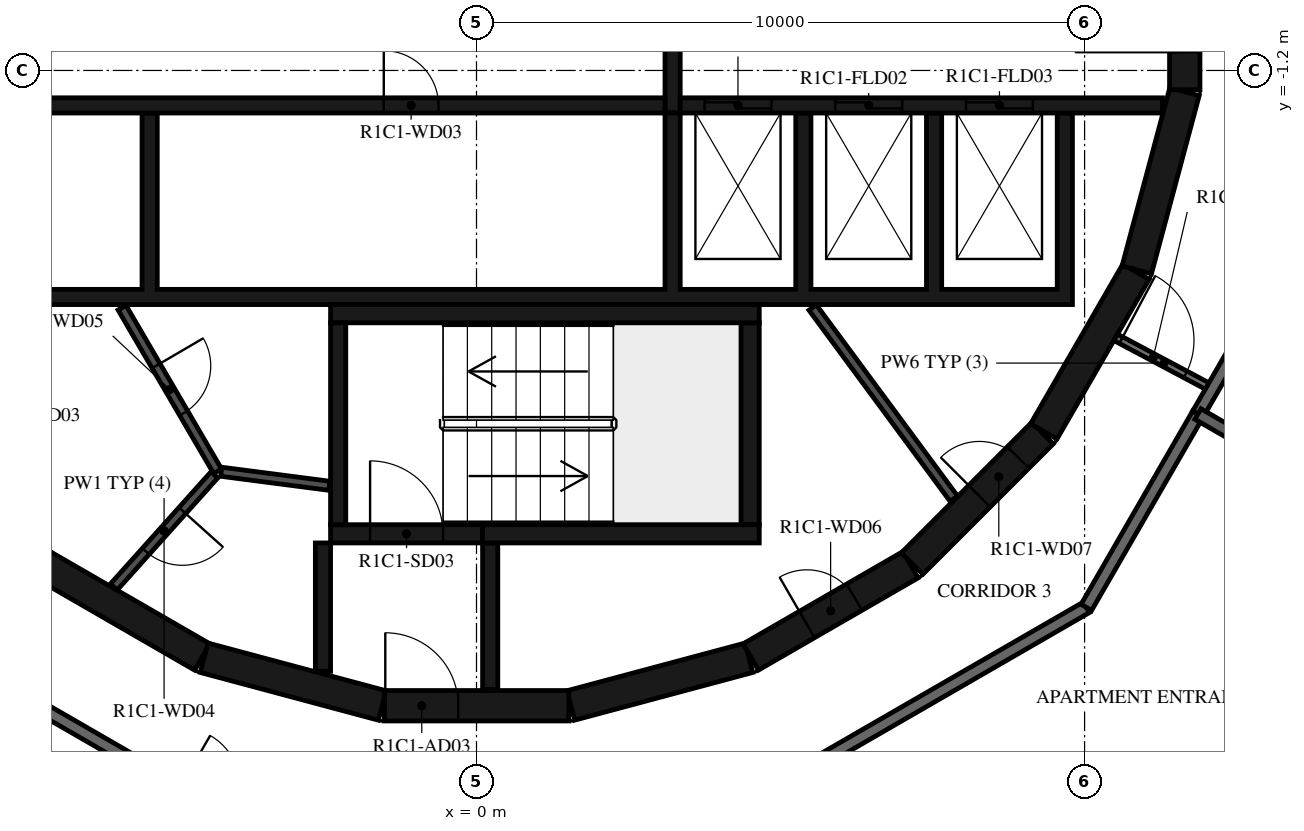
"""IFC4 building model, lengths in metres.
Left out: names, types, materials, properties, quantities, classifications, styles, units other than length and angle.
Written with IfcOpenShell. Run it as: python <this file> out.ifc"""

import sys

from ifc_helpers import new_model, si_unit, direction, frame, frame_2d, origin, place, context, subcontext, project, spatial, polyline, rectangle, outline, extrude, element, fill, save


model = new_model("IFC4")
c1 = context("Model", 3, precision=1e-05, world=origin(), true_north=direction((0.0, 1.0)))
c2 = subcontext(c1, "Body", "Model", "MODEL_VIEW")
j1 = project(units=[si_unit("LENGTHUNIT", "METRE"), si_unit("PLANEANGLEUNIT", "RADIAN")], contexts=[c1])
p1 = place(None, origin())
s1 = spatial("IfcSite", under=j1, at=p1, CompositionType="ELEMENT")
p2 = place(p1, origin())
s2 = spatial("IfcBuilding", under=s1, at=p2, CompositionType="ELEMENT")
p3 = place(p2, frame((0.0, 0.0, 62.9)))
s3 = spatial("IfcBuildingStorey", under=s2, at=p3, CompositionType="ELEMENT", Elevation=62.9)
p4 = place(p3, frame((1.55, -11.643, 0.0), z_axis=(0.0, 0.0, 1.0), x_axis=(0.965948410781, 0.258734743916, 0.0)))
e1 = element("IfcWall", 1, at=p4, inside=s3, PredefinedType="SHEAR", context=c2, shape_type="SweptSolid", body=[
    extrude(rectangle(XDim=3.033, YDim=0.5, at=frame_2d((1.516, 0.0))), origin(), (0.0, 0.0, 1.0), 3.12),
])
p5 = place(p3, frame((4.51, -10.845, 0.0), z_axis=(0.0, 0.0, 1.0), x_axis=(0.865975092491, 0.500087131594, 0.0)))
e2 = element("IfcWall", 2, at=p5, inside=s3, PredefinedType="SHEAR", context=c2, shape_type="SweptSolid", body=[
    extrude(rectangle(XDim=3.033, YDim=0.5, at=frame_2d((1.516, 0.0))), origin(), (0.0, 0.0, 1.0), 3.12),
])
p6 = place(p5, frame((1.066, 0.0, 0.0)))
e3 = element("IfcOpeningElement", 3, at=p6, cuts=e2, PredefinedType="OPENING", context=c2, shape_type="SweptSolid", body=[
    extrude(rectangle(XDim=0.9, YDim=2.1, at=frame_2d((0.45, 1.05))), frame((0.0, 0.26, 0.0), z_axis=(0.0, -1.0, 0.0), x_axis=(1.0, 0.0, 0.0)), (0.0, 0.0, 1.0), 0.52),
])
p7 = place(p3, frame((7.164, -9.308, 0.0), z_axis=(0.0, 0.0, 1.0), x_axis=(0.707106781187, 0.707106781187, 0.0)))
e4 = element("IfcWall", 4, at=p7, inside=s3, PredefinedType="SHEAR", context=c2, shape_type="SweptSolid", body=[
    extrude(rectangle(XDim=3.032, YDim=0.5, at=frame_2d((1.516, 0.0))), origin(), (0.0, 0.0, 1.0), 3.12),
])
p8 = place(p7, frame((1.566, 0.0, 0.0)))
e5 = element("IfcOpeningElement", 5, at=p8, cuts=e4, PredefinedType="OPENING", context=c2, shape_type="SweptSolid", body=[
    extrude(rectangle(XDim=0.9, YDim=2.1, at=frame_2d((0.45, 1.05))), frame((0.0, 0.26, 0.0), z_axis=(0.0, -1.0, 0.0), x_axis=(1.0, 0.0, 0.0)), (0.0, 0.0, 1.0), 0.52),
])
for number, where, z_axis, x_axis in (
    (6, (9.329, -7.137, 0.0), (0.0, 0.0, 1.0), (0.5, 0.866, 0.0)),
    (7, (10.858, -4.479, 0.0), (0.0, 0.0, 1.0), (0.259, 0.966, 0.0)),
):
    element("IfcWall", number, at=place(p3, frame(where, z_axis=z_axis, x_axis=x_axis)), inside=s3, PredefinedType="SHEAR", context=c2, shape_type="SweptSolid", body=[
        extrude(rectangle(XDim=3.033, YDim=0.5, at=frame_2d((1.516, 0.0))), origin(), (0.0, 0.0, 1.0), 3.12),
    ])
p9 = place(p3, frame((11.647, -1.516, 0.0), z_axis=(0.0, 0.0, 1.0), x_axis=(0.0, 1.0, 0.0)))
e8 = element("IfcWall", 8, at=p9, inside=s3, PredefinedType="SHEAR", context=c2, shape_type="SweptSolid", body=[
    extrude(rectangle(XDim=3.033, YDim=0.5, at=frame_2d((1.516, 0.0))), origin(), (0.0, 0.0, 1.0), 3.12),
])
p10 = place(p9, frame((0.616, 0.0, 0.0)))
e9 = element("IfcOpeningElement", 9, at=p10, cuts=e8, PredefinedType="OPENING", context=c2, shape_type="SweptSolid", body=[
    extrude(rectangle(XDim=1.8, YDim=2.1, at=frame_2d((0.9, 1.05))), frame((0.0, 0.26, 0.0), z_axis=(0.0, -1.0, 0.0), x_axis=(1.0, 0.0, 0.0)), (0.0, 0.0, 1.0), 0.52),
])
for number, where, z_axis, x_axis in (
    (10, (-7.137, -9.329, 0.0), (0.0, 0.0, 1.0), (0.866, -0.5, 0.0)),
    (11, (-4.479, -10.858, 0.0), (0.0, 0.0, 1.0), (0.966, -0.259, 0.0)),
):
    element("IfcWall", number, at=place(p3, frame(where, z_axis=z_axis, x_axis=x_axis)), inside=s3, PredefinedType="SHEAR", context=c2, shape_type="SweptSolid", body=[
        extrude(rectangle(XDim=3.033, YDim=0.5, at=frame_2d((1.516, 0.0))), origin(), (0.0, 0.0, 1.0), 3.12),
    ])
p11 = place(p3, frame((-1.516, -11.647, 0.0), z_axis=(0.0, 0.0, 1.0), x_axis=(1.0, 0.0, 0.0)))
e12 = element("IfcWall", 12, at=p11, inside=s3, PredefinedType="SHEAR", context=c2, shape_type="SweptSolid", body=[
    extrude(rectangle(XDim=3.033, YDim=0.5, at=frame_2d((1.516, 0.0))), origin(), (0.0, 0.0, 1.0), 3.12),
])
p12 = place(p11, frame((0.016, 0.0, 0.0)))
e13 = element("IfcOpeningElement", 13, at=p12, cuts=e12, PredefinedType="OPENING", context=c2, shape_type="SweptSolid", body=[
    extrude(rectangle(XDim=1.2, YDim=2.1, at=frame_2d((0.6, 1.05))), frame((0.0, 0.26, 0.0), z_axis=(0.0, -1.0, 0.0), x_axis=(1.0, 0.0, 0.0)), (0.0, 0.0, 1.0), 0.52),
])
p13 = place(p3, frame((-2.275, -8.67, 0.0), z_axis=(0.0, 0.0, 1.0), x_axis=(0.0, 1.0, 0.0)))
e14 = element("IfcWall", 14, at=p13, inside=s3, PredefinedType="SHEAR", context=c2, shape_type="SweptSolid", body=[
    extrude(rectangle(XDim=3.32, YDim=0.25, at=frame_2d((1.66, 0.0))), origin(), (0.0, 0.0, 1.0), 3.12),
])
p14 = place(p3, frame((-2.4, -5.2, 0.0), z_axis=(0.0, 0.0, 1.0), x_axis=(1.0, 0.0, 0.0)))
e15 = element("IfcWall", 15, at=p14, inside=s3, PredefinedType="SHEAR", context=c2, shape_type="SweptSolid", body=[
    extrude(rectangle(XDim=7.05, YDim=0.3, at=frame_2d((3.525, 0.0))), origin(), (0.0, 0.0, 1.0), 3.12),
])
p15 = place(p3, frame((4.5, -8.67, 0.0), z_axis=(0.0, 0.0, 1.0), x_axis=(0.0, 1.0, 0.0)))
e16 = element("IfcWall", 16, at=p15, inside=s3, PredefinedType="SHEAR", context=c2, shape_type="SweptSolid", body=[
    extrude(rectangle(XDim=3.32, YDim=0.3, at=frame_2d((1.66, 0.0))), origin(), (0.0, 0.0, 1.0), 3.12),
])
p16 = place(p3, frame((0.1, -8.82, 0.0), z_axis=(0.0, 0.0, 1.0), x_axis=(1.0, 0.0, 0.0)))
e17 = element("IfcWall", 17, at=p16, inside=s3, PredefinedType="SHEAR", context=c2, shape_type="SweptSolid", body=[
    extrude(rectangle(XDim=4.55, YDim=0.3, at=frame_2d((2.275, 0.0))), origin(), (0.0, 0.0, 1.0), 3.12),
])
p17 = place(p3, frame((-2.4, -8.82, 0.0), z_axis=(0.0, 0.0, 1.0), x_axis=(1.0, 0.0, 0.0)))
e18 = element("IfcWall", 18, at=p17, inside=s3, PredefinedType="SHEAR", context=c2, shape_type="SweptSolid", body=[
    extrude(rectangle(XDim=2.5, YDim=0.3, at=frame_2d((1.25, 0.0))), origin(), (0.0, 0.0, 1.0), 3.12),
])
p18 = place(p17, frame((0.65, 0.0, 0.0)))
e19 = element("IfcOpeningElement", 19, at=p18, cuts=e18, PredefinedType="OPENING", context=c2, shape_type="SweptSolid", body=[
    extrude(rectangle(XDim=1.2, YDim=2.1, at=frame_2d((0.6, 1.05))), frame((0.0, 0.16, 0.0), z_axis=(0.0, -1.0, 0.0), x_axis=(1.0, 0.0, 0.0)), (0.0, 0.0, 1.0), 0.32),
])
p19 = place(p3, frame((-2.525, -8.97, 0.0), z_axis=(0.0, 0.0, 1.0), x_axis=(0.0, -1.0, 0.0)))
e20 = element("IfcWall", 20, at=p19, inside=s3, PredefinedType="SHEAR", context=c2, shape_type="SweptSolid", body=[
    extrude(rectangle(XDim=2.11, YDim=0.25, at=frame_2d((1.055, 0.0))), origin(), (0.0, 0.0, 1.0), 3.12),
])
p20 = place(p3, frame((0.225, -8.97, 0.0), z_axis=(0.0, 0.0, 1.0), x_axis=(0.0, -1.0, 0.0)))
e21 = element("IfcWall", 21, at=p20, inside=s3, PredefinedType="SHEAR", context=c2, shape_type="SweptSolid", body=[
    extrude(rectangle(XDim=2.41, YDim=0.25, at=frame_2d((1.205, 0.0))), origin(), (0.0, 0.0, 1.0), 3.12),
])
p21 = place(p3, origin())
e22 = element("IfcWall", 22, at=p21, inside=s3, PredefinedType="SHEAR", context=c2, shape_type="SweptSolid", body=[
    extrude(outline(polyline([(9.8, -5.05), (9.8, -4.8), (9.8, -1.9), (9.55, -1.9), (9.55, -4.8), (7.65, -4.8), (7.65, -1.9), (7.4, -1.9), (7.4, -4.8), (5.5, -4.8), (5.5, -1.9), (5.25, -1.9), (5.25, -4.8), (3.35, -4.8), (3.35, -1.9), (3.1, -1.9), (3.1, -4.8), (-5.25, -4.8), (-5.25, -1.9), (-5.5, -1.9), (-5.5, -4.8), (-7.4, -4.8), (-7.4, -1.9), (-7.65, -1.9), (-7.65, -4.8), (-9.55, -4.8), (-9.55, -1.9), (-9.8, -1.9), (-9.8, -4.8), (-9.8, -5.05), (9.8, -5.05)])), origin(), (0.0, 0.0, 1.0), 3.12),
])
p22 = place(p3, frame((-11.28, -1.775, 0.0), z_axis=(0.0, 0.0, 1.0), x_axis=(1.0, 0.0, 0.0)))
e23 = element("IfcWall", 23, at=p22, inside=s3, PredefinedType="SHEAR", context=c2, shape_type="SweptSolid", body=[
    extrude(rectangle(XDim=14.38, YDim=0.25, at=frame_2d((7.19, 0.0))), origin(), (0.0, 0.0, 1.0), 3.12),
])
p23 = place(p22, frame((9.755, 0.0, 0.0)))
e24 = element("IfcOpeningElement", 24, at=p23, cuts=e23, PredefinedType="OPENING", context=c2, shape_type="SweptSolid", body=[
    extrude(rectangle(XDim=0.9, YDim=2.1, at=frame_2d((0.45, 1.05))), frame((0.0, 0.135, 0.0), z_axis=(0.0, -1.0, 0.0), x_axis=(1.0, 0.0, 0.0)), (0.0, 0.0, 1.0), 0.27),
])
p24 = place(p3, frame((3.35, -1.775, 0.0), z_axis=(0.0, 0.0, 1.0), x_axis=(1.0, 0.0, 0.0)))
e25 = element("IfcWall", 25, at=p24, inside=s3, PredefinedType="SHEAR", context=c2, shape_type="SweptSolid", body=[
    extrude(rectangle(XDim=7.93, YDim=0.25, at=frame_2d((3.965, 0.0))), origin(), (0.0, 0.0, 1.0), 3.12),
])
p25 = place(p24, frame((0.4, 0.0, 0.0)))
e26 = element("IfcOpeningElement", 26, at=p25, cuts=e25, PredefinedType="OPENING", context=c2, shape_type="SweptSolid", body=[
    extrude(rectangle(XDim=1.1, YDim=2.4, at=frame_2d((0.55, 1.2))), frame((0.0, 0.135, 0.0), z_axis=(0.0, -1.0, 0.0), x_axis=(1.0, 0.0, 0.0)), (0.0, 0.0, 1.0), 0.27),
])
p26 = place(p24, frame((2.55, 0.0, 0.0)))
e27 = element("IfcOpeningElement", 27, at=p26, cuts=e25, PredefinedType="OPENING", context=c2, shape_type="SweptSolid", body=[
    extrude(rectangle(XDim=1.1, YDim=2.4, at=frame_2d((0.55, 1.2))), frame((0.0, 0.135, 0.0), z_axis=(0.0, -1.0, 0.0), x_axis=(1.0, 0.0, 0.0)), (0.0, 0.0, 1.0), 0.27),
])
p27 = place(p24, frame((4.7, 0.0, 0.0)))
e28 = element("IfcOpeningElement", 28, at=p27, cuts=e25, PredefinedType="OPENING", context=c2, shape_type="SweptSolid", body=[
    extrude(rectangle(XDim=1.1, YDim=2.4, at=frame_2d((0.55, 1.2))), frame((0.0, 0.135, 0.0), z_axis=(0.0, -1.0, 0.0), x_axis=(1.0, 0.0, 0.0)), (0.0, 0.0, 1.0), 0.27),
])
p28 = place(p3, frame((3.225, -1.9, 0.0), z_axis=(0.0, 0.0, 1.0), x_axis=(0.0, 1.0, 0.0)))
e29 = element("IfcWall", 29, at=p28, inside=s3, PredefinedType="SHEAR", context=c2, shape_type="SweptSolid", body=[
    extrude(rectangle(XDim=3.8, YDim=0.25, at=frame_2d((1.9, 0.0))), origin(), (0.0, 0.0, 1.0), 3.12),
])
p29 = place(p3, frame((5.528, -5.098, 0.0), z_axis=(0.0, 0.0, 1.0), x_axis=(0.594034318069, -0.804439698769, 0.0)))
e30 = element("IfcWall", 30, at=p29, inside=s3, PredefinedType="PARTITIONING", context=c2, shape_type="SweptSolid", body=[
    extrude(rectangle(XDim=3.907, YDim=0.15, at=frame_2d((1.953, 0.0))), origin(), (0.0, 0.0, 1.0), 3.12),
])
p30 = place(p3, frame((-5.829, -5.102, 0.0), z_axis=(0.0, 0.0, 1.0), x_axis=(0.504480008384, -0.863423373057, 0.0)))
e31 = element("IfcWall", 31, at=p30, inside=s3, PredefinedType="PARTITIONING", context=c2, shape_type="SweptSolid", body=[
    extrude(rectangle(XDim=3.115, YDim=0.15, at=frame_2d((1.558, 0.0))), origin(), (0.0, 0.0, 1.0), 3.12),
])
p31 = place(p30, frame((1.107, 0.0, 0.0)))
e32 = element("IfcOpeningElement", 32, at=p31, cuts=e31, PredefinedType="OPENING", context=c2, shape_type="SweptSolid", body=[
    extrude(rectangle(XDim=0.9, YDim=2.1, at=frame_2d((0.45, 1.05))), frame((0.0, 0.085, 0.0), z_axis=(0.0, -1.0, 0.0), x_axis=(1.0, 0.0, 0.0)), (0.0, 0.0, 1.0), 0.17),
])
p32 = place(p3, frame((-4.311, -7.851, 0.0), z_axis=(0.0, 0.0, 1.0), x_axis=(-0.667869133096, -0.744278725383, 0.0)))
e33 = element("IfcWall", 33, at=p32, inside=s3, PredefinedType="PARTITIONING", context=c2, shape_type="SweptSolid", body=[
    extrude(rectangle(XDim=2.476, YDim=0.15, at=frame_2d((1.238, 0.0))), origin(), (0.0, 0.0, 1.0), 3.12),
])
p33 = place(p32, frame((0.788, 0.0, 0.0)))
e34 = element("IfcOpeningElement", 34, at=p33, cuts=e33, PredefinedType="OPENING", context=c2, shape_type="SweptSolid", body=[
    extrude(rectangle(XDim=0.9, YDim=2.1, at=frame_2d((0.45, 1.05))), frame((0.0, 0.085, 0.0), z_axis=(0.0, -1.0, 0.0), x_axis=(1.0, 0.0, 0.0)), (0.0, 0.0, 1.0), 0.17),
])
p34 = place(p3, frame((-4.198, -7.799, 0.0), z_axis=(0.0, 0.0, 1.0), x_axis=(0.991686747293, -0.128675542523, 0.0)))
e35 = element("IfcWall", 35, at=p34, inside=s3, PredefinedType="PARTITIONING", context=c2, shape_type="SweptSolid", body=[
    extrude(rectangle(XDim=1.793, YDim=0.15, at=frame_2d((0.896, 0.0))), origin(), (0.0, 0.0, 1.0), 3.12),
])
p35 = place(p3, frame((10.511, -5.589, 0.0), z_axis=(0.0, 0.0, 1.0), x_axis=(0.88294043061, -0.469485032769, 0.0)))
e36 = element("IfcWall", 36, at=p35, inside=s3, PredefinedType="PARTITIONING", context=c2, shape_type="SweptSolid", body=[
    extrude(rectangle(XDim=1.804, YDim=0.12, at=frame_2d((0.902, 0.0))), origin(), (0.0, 0.0, 1.0), 3.12),
])
p36 = place(p35, frame((0.1, 0.0, 0.0)))
e37 = element("IfcOpeningElement", 37, at=p36, cuts=e36, PredefinedType="OPENING", context=c2, shape_type="SweptSolid", body=[
    extrude(rectangle(XDim=1.2, YDim=2.1, at=frame_2d((0.6, 1.05))), frame((0.0, 0.07, 0.0), z_axis=(0.0, -1.0, 0.0), x_axis=(1.0, 0.0, 0.0)), (0.0, 0.0, 1.0), 0.14),
])
p37 = place(p3, frame((11.865, -6.85, 0.0), z_axis=(0.0, 0.0, 1.0), x_axis=(0.499987270552, 0.86603275301, 0.0)))
e38 = element("IfcWall", 38, at=p37, inside=s3, PredefinedType="STANDARD", context=c2, shape_type="SweptSolid", body=[
    extrude(rectangle(XDim=3.671, YDim=0.2, at=frame_2d((1.835, 0.0))), origin(), (0.0, 0.0, 1.0), 3.12),
])
p38 = place(p3, frame((-10.029, -10.029, 0.0), z_axis=(0.0, 0.0, 1.0), x_axis=(0.866022878987, -0.500004373052, 0.0)))
e39 = element("IfcWall", 39, at=p38, inside=s3, PredefinedType="STANDARD", context=c2, shape_type="SweptSolid", body=[
    extrude(rectangle(XDim=7.146, YDim=0.2, at=frame_2d((3.573, 0.0))), origin(), (0.0, 0.0, 1.0), 3.12),
])
p39 = place(p38, frame((5.947, 0.0, 0.0)))
e40 = element("IfcOpeningElement", 40, at=p39, cuts=e39, PredefinedType="OPENING", context=c2, shape_type="SweptSolid", body=[
    extrude(rectangle(XDim=1.0, YDim=2.1, at=frame_2d((0.5, 1.05))), frame((0.0, 0.11, 0.0), z_axis=(0.0, -1.0, 0.0), x_axis=(1.0, 0.0, 0.0)), (0.0, 0.0, 1.0), 0.22),
])
p40 = place(p3, frame((3.671, -13.7, 0.0), z_axis=(0.0, 0.0, 1.0), x_axis=(0.866024439905, 0.500001669485, 0.0)))
e41 = element("IfcWall", 41, at=p40, inside=s3, PredefinedType="STANDARD", context=c2, shape_type="SweptSolid", body=[
    extrude(rectangle(XDim=7.342, YDim=0.2, at=frame_2d((3.671, 0.0))), origin(), (0.0, 0.0, 1.0), 3.12),
])
p41 = place(p3, frame((10.029, -10.029, 0.0), z_axis=(0.0, 0.0, 1.0), x_axis=(0.50001606911, 0.866016126081, 0.0)))
e42 = element("IfcWall", 42, at=p41, inside=s3, PredefinedType="STANDARD", context=c2, shape_type="SweptSolid", body=[
    extrude(rectangle(XDim=3.671, YDim=0.2, at=frame_2d((1.835, 0.0))), origin(), (0.0, 0.0, 1.0), 3.12),
])
p42 = place(p3, frame((16.817, -9.709, 0.0), z_axis=(0.0, 0.0, 1.0), x_axis=(-0.86604338933, 0.499968846828, 0.0)))
e43 = element("IfcWall", 43, at=p42, inside=s3, PredefinedType="STANDARD", context=c2, shape_type="SweptSolid", body=[
    extrude(rectangle(XDim=5.718, YDim=0.2, at=frame_2d((2.859, 0.0))), origin(), (0.0, 0.0, 1.0), 3.12),
])
p43 = place(p3, frame((-11.127, -11.127, 0.0), z_axis=(0.0, 0.0, 1.0), x_axis=(0.866034514313, -0.499984219769, 0.0)))
e44 = element("IfcWall", 44, at=p43, inside=s3, PredefinedType="PARTITIONING", context=c2, shape_type="SweptSolid", body=[
    extrude(rectangle(XDim=5.006, YDim=0.12, at=frame_2d((2.503, 0.0))), origin(), (0.0, 0.0, 1.0), 3.12),
])
p44 = place(p43, frame((0.2, 0.0, 0.0)))
e45 = element("IfcOpeningElement", 45, at=p44, cuts=e44, PredefinedType="OPENING", context=c2, shape_type="SweptSolid", body=[
    extrude(rectangle(XDim=0.9, YDim=2.1, at=frame_2d((0.45, 1.05))), frame((0.0, 0.07, 0.0), z_axis=(0.0, -1.0, 0.0), x_axis=(1.0, 0.0, 0.0)), (0.0, 0.0, 1.0), 0.14),
])
p45 = place(p18, origin())
e46 = element("IfcDoor", 46, at=p45, inside=s3, OperationType="SINGLE_SWING_LEFT", PredefinedType="DOOR", context=c2, shape_type="SweptSolid", body=[
    extrude(rectangle(XDim=1.2, YDim=2.1, at=frame_2d((0.6, 1.05))), frame((0.0, 0.025, 0.0), z_axis=(0.0, -1.0, 0.0), x_axis=(1.0, 0.0, 0.0)), (0.0, 0.0, 1.0), 0.05),
])
fill(e19, e46)
p46 = place(p12, origin())
e47 = element("IfcDoor", 47, at=p46, inside=s3, OperationType="SINGLE_SWING_RIGHT", PredefinedType="DOOR", context=c2, shape_type="SweptSolid", body=[
    extrude(rectangle(XDim=1.2, YDim=2.1, at=frame_2d((0.6, 1.05))), frame((0.0, 0.025, 0.0), z_axis=(0.0, -1.0, 0.0), x_axis=(1.0, 0.0, 0.0)), (0.0, 0.0, 1.0), 0.05),
])
fill(e13, e47)
p47 = place(p10, origin())
e48 = element("IfcDoor", 48, at=p47, inside=s3, OperationType="DOUBLE_DOOR_SINGLE_SWING", PredefinedType="DOOR", context=c2, shape_type="SweptSolid", body=[
    extrude(rectangle(XDim=1.8, YDim=2.1, at=frame_2d((0.9, 1.05))), frame((0.0, 0.025, 0.0), z_axis=(0.0, -1.0, 0.0), x_axis=(1.0, 0.0, 0.0)), (0.0, 0.0, 1.0), 0.05),
])
fill(e9, e48)
p48 = place(p25, origin())
e49 = element("IfcDoor", 49, at=p48, inside=s3, OperationType="DOUBLE_DOOR_SLIDING", PredefinedType="DOOR", context=c2, shape_type="SweptSolid", body=[
    extrude(rectangle(XDim=1.1, YDim=2.4, at=frame_2d((0.55, 1.2))), frame((0.0, 0.025, 0.0), z_axis=(0.0, -1.0, 0.0), x_axis=(1.0, 0.0, 0.0)), (0.0, 0.0, 1.0), 0.05),
])
fill(e26, e49)
p49 = place(p26, origin())
e50 = element("IfcDoor", 50, at=p49, inside=s3, OperationType="DOUBLE_DOOR_SLIDING", PredefinedType="DOOR", context=c2, shape_type="SweptSolid", body=[
    extrude(rectangle(XDim=1.1, YDim=2.4, at=frame_2d((0.55, 1.2))), frame((0.0, 0.025, 0.0), z_axis=(0.0, -1.0, 0.0), x_axis=(1.0, 0.0, 0.0)), (0.0, 0.0, 1.0), 0.05),
])
fill(e27, e50)
p50 = place(p27, origin())
e51 = element("IfcDoor", 51, at=p50, inside=s3, OperationType="DOUBLE_DOOR_SLIDING", PredefinedType="DOOR", context=c2, shape_type="SweptSolid", body=[
    extrude(rectangle(XDim=1.1, YDim=2.4, at=frame_2d((0.55, 1.2))), frame((0.0, 0.025, 0.0), z_axis=(0.0, -1.0, 0.0), x_axis=(1.0, 0.0, 0.0)), (0.0, 0.0, 1.0), 0.05),
])
fill(e28, e51)
p51 = place(p23, origin())
e52 = element("IfcDoor", 52, at=p51, inside=s3, OperationType="SINGLE_SWING_RIGHT", PredefinedType="DOOR", context=c2, shape_type="SweptSolid", body=[
    extrude(rectangle(XDim=0.9, YDim=2.1, at=frame_2d((0.45, 1.05))), frame((0.0, 0.025, 0.0), z_axis=(0.0, -1.0, 0.0), x_axis=(1.0, 0.0, 0.0)), (0.0, 0.0, 1.0), 0.05),
])
fill(e24, e52)
p52 = place(p33, origin())
e53 = element("IfcDoor", 53, at=p52, inside=s3, OperationType="SINGLE_SWING_LEFT", PredefinedType="DOOR", context=c2, shape_type="SweptSolid", body=[
    extrude(rectangle(XDim=0.9, YDim=2.1, at=frame_2d((0.45, 1.05))), frame((0.0, 0.025, 0.0), z_axis=(0.0, -1.0, 0.0), x_axis=(1.0, 0.0, 0.0)), (0.0, 0.0, 1.0), 0.05),
])
fill(e34, e53)
p53 = place(p31, origin())
e54 = element("IfcDoor", 54, at=p53, inside=s3, OperationType="SINGLE_SWING_RIGHT", PredefinedType="DOOR", context=c2, shape_type="SweptSolid", body=[
    extrude(rectangle(XDim=0.9, YDim=2.1, at=frame_2d((0.45, 1.05))), frame((0.0, 0.025, 0.0), z_axis=(0.0, -1.0, 0.0), x_axis=(1.0, 0.0, 0.0)), (0.0, 0.0, 1.0), 0.05),
])
fill(e32, e54)
p54 = place(p6, origin())
e55 = element("IfcDoor", 55, at=p54, inside=s3, OperationType="SINGLE_SWING_LEFT", PredefinedType="DOOR", context=c2, shape_type="SweptSolid", body=[
    extrude(rectangle(XDim=0.9, YDim=2.1, at=frame_2d((0.45, 1.05))), frame((0.0, 0.025, 0.0), z_axis=(0.0, -1.0, 0.0), x_axis=(1.0, 0.0, 0.0)), (0.0, 0.0, 1.0), 0.05),
])
fill(e3, e55)
p55 = place(p8, origin())
e56 = element("IfcDoor", 56, at=p55, inside=s3, OperationType="SINGLE_SWING_RIGHT", PredefinedType="DOOR", context=c2, shape_type="SweptSolid", body=[
    extrude(rectangle(XDim=0.9, YDim=2.1, at=frame_2d((0.45, 1.05))), frame((0.0, 0.025, 0.0), z_axis=(0.0, -1.0, 0.0), x_axis=(1.0, 0.0, 0.0)), (0.0, 0.0, 1.0), 0.05),
])
fill(e5, e56)
p56 = place(p36, origin())
e57 = element("IfcDoor", 57, at=p56, inside=s3, OperationType="DOUBLE_DOOR_SINGLE_SWING", PredefinedType="DOOR", context=c2, shape_type="SweptSolid", body=[
    extrude(rectangle(XDim=1.2, YDim=2.1, at=frame_2d((0.6, 1.05))), frame((0.0, 0.025, 0.0), z_axis=(0.0, -1.0, 0.0), x_axis=(1.0, 0.0, 0.0)), (0.0, 0.0, 1.0), 0.05),
])
fill(e37, e57)
save(model, sys.argv[1])
